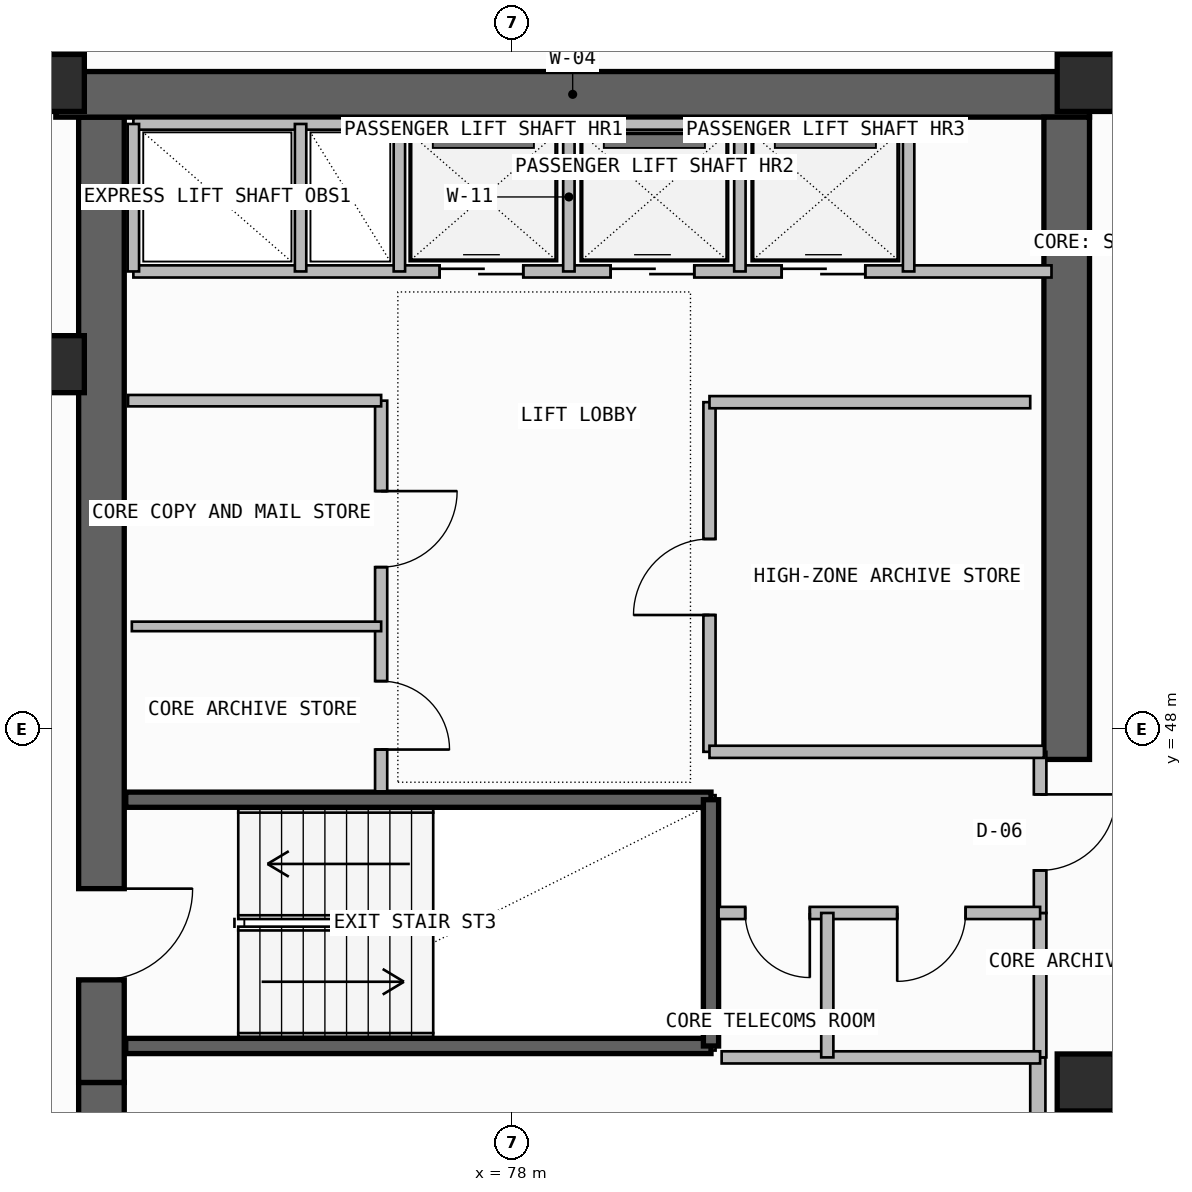
"""IFC4 building model, lengths in metres.
Left out: names, types, materials, properties, quantities, classifications, styles, units other than length and angle.
Written with IfcOpenShell. Run it as: python <this file> out.ifc"""

import sys

from ifc_helpers import new_model, si_unit, direction, frame, frame_2d, origin, origin_2d, place, context, subcontext, project, spatial, rectangle, extrude, element, fill, save


model = new_model("IFC4")
c1 = context("Model", 3, precision=1e-05, world=origin(), true_north=direction((0.0, 1.0)))
c2 = subcontext(c1, "Body", "Model", "MODEL_VIEW")
j1 = project(units=[si_unit("LENGTHUNIT", "METRE"), si_unit("PLANEANGLEUNIT", "RADIAN")], contexts=[c1])
p1 = place(None, origin())
s1 = spatial("IfcSite", under=j1, at=p1, CompositionType="ELEMENT")
p2 = place(p1, origin())
s2 = spatial("IfcBuilding", under=s1, at=p2, CompositionType="ELEMENT")
p3 = place(p2, frame((0.0, 0.0, 267.78)))
s3 = spatial("IfcBuildingStorey", under=s2, at=p3, CompositionType="ELEMENT", Elevation=267.78)
p4 = place(p3, frame((72.6, 35.5, -0.26), z_axis=(0.0, 0.0, 1.0), x_axis=(0.0, 1.0, 0.0)))
e1 = element("IfcWall", 1, at=p4, inside=s3, PredefinedType="SHEAR", context=c2, shape_type="SweptSolid", body=[
    extrude(rectangle(XDim=7.85, YDim=0.6, at=frame_2d((3.925, 0.0))), origin(), (0.0, 0.0, 1.0), 3.52),
])
p5 = place(p4, frame((1.45, 0.0, 0.26)))
e2 = element("IfcOpeningElement", 2, at=p5, cuts=e1, PredefinedType="OPENING", context=c2, shape_type="SweptSolid", body=[
    extrude(rectangle(XDim=1.2, YDim=2.2, at=frame_2d((0.6, 1.1))), frame((0.0, 0.31, 0.0), z_axis=(0.0, -1.0, 0.0), x_axis=(1.0, 0.0, 0.0)), (0.0, 0.0, 1.0), 0.62),
])
p6 = place(p3, frame((72.6, 43.35, -0.26), z_axis=(0.0, 0.0, 1.0), x_axis=(0.0, 1.0, 0.0)))
e3 = element("IfcWall", 3, at=p6, inside=s3, PredefinedType="SHEAR", context=c2, shape_type="SweptSolid", body=[
    extrude(rectangle(XDim=12.7, YDim=0.6, at=frame_2d((6.35, 0.0))), origin(), (0.0, 0.0, 1.0), 3.52),
])
p7 = place(p6, frame((1.35, 0.0, 0.26)))
e4 = element("IfcOpeningElement", 4, at=p7, cuts=e3, PredefinedType="OPENING", context=c2, shape_type="SweptSolid", body=[
    extrude(rectangle(XDim=1.2, YDim=2.2, at=frame_2d((0.6, 1.1))), frame((0.0, 0.31, 0.0), z_axis=(0.0, -1.0, 0.0), x_axis=(1.0, 0.0, 0.0)), (0.0, 0.0, 1.0), 0.62),
])
p8 = place(p3, frame((72.0, 56.35, -0.26), z_axis=(0.0, 0.0, 1.0), x_axis=(1.0, 0.0, 0.0)))
e5 = element("IfcWall", 5, at=p8, inside=s3, PredefinedType="SHEAR", context=c2, shape_type="SweptSolid", body=[
    extrude(rectangle(XDim=13.6, YDim=0.6, at=frame_2d((6.8, 0.0))), origin(), (0.0, 0.0, 1.0), 3.52),
])
p9 = place(p3, frame((85.3, 47.6, -0.26), z_axis=(0.0, 0.0, 1.0), x_axis=(0.0, 1.0, 0.0)))
e6 = element("IfcWall", 6, at=p9, inside=s3, PredefinedType="SHEAR", context=c2, shape_type="SweptSolid", body=[
    extrude(rectangle(XDim=8.45, YDim=0.6, at=frame_2d((4.225, 0.0))), origin(), (0.0, 0.0, 1.0), 3.52),
])
for number, where, z_axis, x_axis in (
    (7, (85.55, 43.35, 0.0), (0.0, 0.0, 1.0), (1.0, 0.0, 0.0)),
    (8, (72.0, 52.8, 0.0), (0.0, 0.0, 1.0), (1.0, 0.0, 0.0)),
    (9, (72.0, 56.5, 0.0), (0.0, 0.0, 1.0), (1.0, 0.0, 0.0)),
    (10, (85.55, 56.5, 0.0), (0.0, 0.0, 1.0), (1.0, 0.0, 0.0)),
):
    element("IfcColumn", number, at=place(p3, frame(where, z_axis=z_axis, x_axis=x_axis)), inside=s3, PredefinedType="COLUMN", context=c2, shape_type="SweptSolid", body=[
        extrude(rectangle(XDim=0.75, YDim=0.75, at=origin_2d()), origin(), (0.0, 0.0, 1.0), 3.52),
    ])
p10 = place(p3, frame((84.92, 38.85, 0.0), z_axis=(0.0, 0.0, 1.0), x_axis=(0.0, 1.0, 0.0)))
e11 = element("IfcWall", 11, at=p10, inside=s3, PredefinedType="SOLIDWALL", context=c2, shape_type="SweptSolid", body=[
    extrude(rectangle(XDim=4.83, YDim=0.2, at=frame_2d((2.415, 0.0))), origin(), (0.0, 0.0, 1.0), 3.26),
])
p11 = place(p10, frame((1.25, 0.0, 0.0)))
e12 = element("IfcOpeningElement", 12, at=p11, cuts=e11, PredefinedType="OPENING", context=c2, shape_type="SweptSolid", body=[
    extrude(rectangle(XDim=1.1, YDim=2.2, at=frame_2d((0.55, 1.1))), frame((0.0, 0.11, 0.0), z_axis=(0.0, -1.0, 0.0), x_axis=(1.0, 0.0, 0.0)), (0.0, 0.0, 1.0), 0.22),
])
for number, where, z_axis, x_axis in (
    (13, (72.92, 43.83, -0.26), (0.0, 0.0, 1.0), (1.0, 0.0, 0.0)),
    (14, (72.92, 47.07, -0.26), (0.0, 0.0, 1.0), (1.0, 0.0, 0.0)),
):
    element("IfcWall", number, at=place(p3, frame(where, z_axis=z_axis, x_axis=x_axis)), inside=s3, PredefinedType="SOLIDWALL", context=c2, shape_type="SweptSolid", body=[
        extrude(rectangle(XDim=7.7, YDim=0.2, at=frame_2d((3.85, 0.0))), origin(), (0.0, 0.0, 1.0), 3.52),
    ])
p12 = place(p3, frame((80.62, 43.83, -0.26), z_axis=(0.0, 0.0, 1.0), x_axis=(0.0, 1.0, 0.0)))
e15 = element("IfcWall", 15, at=p12, inside=s3, PredefinedType="SOLIDWALL", context=c2, shape_type="SweptSolid", body=[
    extrude(rectangle(XDim=3.24, YDim=0.2, at=frame_2d((1.62, 0.0))), origin(), (0.0, 0.0, 1.0), 3.52),
])
p13 = place(p3, frame((84.95, 43.68, 0.0), z_axis=(0.0, 0.0, 1.0), x_axis=(0.0, 1.0, 0.0)))
e16 = element("IfcWall", 16, at=p13, inside=s3, PredefinedType="PLUMBINGWALL", context=c2, shape_type="SweptSolid", body=[
    extrude(rectangle(XDim=1.9, YDim=0.165, at=frame_2d((0.95, 0.0))), origin(), (0.0, 0.0, 1.0), 3.26),
])
p14 = place(p3, frame((84.95, 45.58, 0.0), z_axis=(0.0, 0.0, 1.0), x_axis=(0.0, 1.0, 0.0)))
e17 = element("IfcWall", 17, at=p14, inside=s3, PredefinedType="PARTITIONING", context=c2, shape_type="SweptSolid", body=[
    extrude(rectangle(XDim=2.12, YDim=0.165, at=frame_2d((1.06, 0.0))), origin(), (0.0, 0.0, 1.0), 3.26),
])
p15 = place(p14, frame((0.56, 0.0, 0.0)))
e18 = element("IfcOpeningElement", 18, at=p15, cuts=e17, PredefinedType="OPENING", context=c2, shape_type="SweptSolid", body=[
    extrude(rectangle(XDim=1.0, YDim=2.2, at=frame_2d((0.5, 1.1))), frame((0.0, 0.093, 0.0), z_axis=(0.0, -1.0, 0.0), x_axis=(1.0, 0.0, 0.0)), (0.0, 0.0, 1.0), 0.185),
])
p16 = place(p3, frame((80.72, 45.58, 0.0), z_axis=(0.0, 0.0, 1.0), x_axis=(1.0, 0.0, 0.0)))
e19 = element("IfcWall", 19, at=p16, inside=s3, PredefinedType="PLUMBINGWALL", context=c2, shape_type="SweptSolid", body=[
    extrude(rectangle(XDim=4.23, YDim=0.16, at=frame_2d((2.115, 0.0))), origin(), (0.0, 0.0, 1.0), 3.26),
])
p17 = place(p16, frame((0.35, 0.0, 0.0)))
e20 = element("IfcOpeningElement", 20, at=p17, cuts=e19, PredefinedType="OPENING", context=c2, shape_type="SweptSolid", body=[
    extrude(rectangle(XDim=0.85, YDim=2.05, at=frame_2d((0.425, 1.025))), frame((0.0, 0.09, 0.0), z_axis=(0.0, -1.0, 0.0), x_axis=(1.0, 0.0, 0.0)), (0.0, 0.0, 1.0), 0.18),
])
p18 = place(p16, frame((2.35, 0.0, 0.0)))
e21 = element("IfcOpeningElement", 21, at=p18, cuts=e19, PredefinedType="OPENING", context=c2, shape_type="SweptSolid", body=[
    extrude(rectangle(XDim=0.9, YDim=2.1, at=frame_2d((0.45, 1.05))), frame((0.0, 0.09, 0.0), z_axis=(0.0, -1.0, 0.0), x_axis=(1.0, 0.0, 0.0)), (0.0, 0.0, 1.0), 0.18),
])
p19 = place(p3, frame((80.76, 43.68, 0.0), z_axis=(0.0, 0.0, 1.0), x_axis=(1.0, 0.0, 0.0)))
e22 = element("IfcWall", 22, at=p19, inside=s3, PredefinedType="PLUMBINGWALL", context=c2, shape_type="SweptSolid", body=[
    extrude(rectangle(XDim=4.19, YDim=0.16, at=frame_2d((2.095, 0.0))), origin(), (0.0, 0.0, 1.0), 3.26),
])
p20 = place(p3, frame((82.15, 43.68, 0.0), z_axis=(0.0, 0.0, 1.0), x_axis=(0.0, 1.0, 0.0)))
e23 = element("IfcWall", 23, at=p20, inside=s3, PredefinedType="PLUMBINGWALL", context=c2, shape_type="SweptSolid", body=[
    extrude(rectangle(XDim=1.9, YDim=0.16, at=frame_2d((0.95, 0.0))), origin(), (0.0, 0.0, 1.0), 3.26),
])
p21 = place(p3, frame((76.28, 47.18, 0.0), z_axis=(0.0, 0.0, 1.0), x_axis=(0.0, 1.0, 0.0)))
e24 = element("IfcWall", 24, at=p21, inside=s3, PredefinedType="SOLIDWALL", context=c2, shape_type="SweptSolid", body=[
    extrude(rectangle(XDim=5.14, YDim=0.16, at=frame_2d((2.57, 0.0))), origin(), (0.0, 0.0, 1.0), 3.26),
])
p22 = place(p21, frame((0.55, 0.0, 0.0)))
e25 = element("IfcOpeningElement", 25, at=p22, cuts=e24, PredefinedType="OPENING", context=c2, shape_type="SweptSolid", body=[
    extrude(rectangle(XDim=0.9, YDim=2.1, at=frame_2d((0.45, 1.05))), frame((0.0, 0.09, 0.0), z_axis=(0.0, -1.0, 0.0), x_axis=(1.0, 0.0, 0.0)), (0.0, 0.0, 1.0), 0.18),
])
p23 = place(p21, frame((2.95, 0.0, 0.0)))
e26 = element("IfcOpeningElement", 26, at=p23, cuts=e24, PredefinedType="OPENING", context=c2, shape_type="SweptSolid", body=[
    extrude(rectangle(XDim=1.0, YDim=2.2, at=frame_2d((0.5, 1.1))), frame((0.0, 0.09, 0.0), z_axis=(0.0, -1.0, 0.0), x_axis=(1.0, 0.0, 0.0)), (0.0, 0.0, 1.0), 0.18),
])
p24 = place(p3, frame((72.95, 52.32, 0.0), z_axis=(0.0, 0.0, 1.0), x_axis=(1.0, 0.0, 0.0)))
e27 = element("IfcWall", 27, at=p24, inside=s3, PredefinedType="SOLIDWALL", context=c2, shape_type="SweptSolid", body=[
    extrude(rectangle(XDim=3.33, YDim=0.15, at=frame_2d((1.665, 0.0))), origin(), (0.0, 0.0, 1.0), 3.26),
])
p25 = place(p3, frame((73.0, 49.35, 0.0), z_axis=(0.0, 0.0, 1.0), x_axis=(1.0, 0.0, 0.0)))
e28 = element("IfcWall", 28, at=p25, inside=s3, PredefinedType="PARTITIONING", context=c2, shape_type="SweptSolid", body=[
    extrude(rectangle(XDim=3.28, YDim=0.125, at=frame_2d((1.64, 0.0))), origin(), (0.0, 0.0, 1.0), 3.26),
])
p26 = place(p3, frame((80.6, 47.7, 0.0), z_axis=(0.0, 0.0, 1.0), x_axis=(0.0, 1.0, 0.0)))
e29 = element("IfcWall", 29, at=p26, inside=s3, PredefinedType="SOLIDWALL", context=c2, shape_type="SweptSolid", body=[
    extrude(rectangle(XDim=4.6, YDim=0.16, at=frame_2d((2.3, 0.0))), origin(), (0.0, 0.0, 1.0), 3.26),
])
p27 = place(p26, frame((1.8, 0.0, 0.0)))
e30 = element("IfcOpeningElement", 30, at=p27, cuts=e29, PredefinedType="OPENING", context=c2, shape_type="SweptSolid", body=[
    extrude(rectangle(XDim=1.0, YDim=2.2, at=frame_2d((0.5, 1.1))), frame((0.0, 0.09, 0.0), z_axis=(0.0, -1.0, 0.0), x_axis=(1.0, 0.0, 0.0)), (0.0, 0.0, 1.0), 0.18),
])
p28 = place(p3, frame((80.6, 47.7, 0.0), z_axis=(0.0, 0.0, 1.0), x_axis=(1.0, 0.0, 0.0)))
e31 = element("IfcWall", 31, at=p28, inside=s3, PredefinedType="SOLIDWALL", context=c2, shape_type="SweptSolid", body=[
    extrude(rectangle(XDim=4.4, YDim=0.16, at=frame_2d((2.2, 0.0))), origin(), (0.0, 0.0, 1.0), 3.26),
])
p29 = place(p3, frame((80.6, 52.3, 0.0), z_axis=(0.0, 0.0, 1.0), x_axis=(1.0, 0.0, 0.0)))
e32 = element("IfcWall", 32, at=p29, inside=s3, PredefinedType="SOLIDWALL", context=c2, shape_type="SweptSolid", body=[
    extrude(rectangle(XDim=4.22, YDim=0.16, at=frame_2d((2.11, 0.0))), origin(), (0.0, 0.0, 1.0), 3.26),
])
p30 = place(p3, frame((73.02, 54.02, 0.0), z_axis=(0.0, 0.0, 1.0), x_axis=(1.0, 0.0, 0.0)))
e33 = element("IfcWall", 33, at=p30, inside=s3, PredefinedType="SOLIDWALL", context=c2, shape_type="SweptSolid", body=[
    extrude(rectangle(XDim=12.08, YDim=0.16, at=frame_2d((6.04, 0.0))), origin(), (0.0, 0.0, 1.0), 3.26),
])
p31 = place(p30, frame((4.03, 0.0, 0.0)))
e34 = element("IfcOpeningElement", 34, at=p31, cuts=e33, PredefinedType="OPENING", context=c2, shape_type="SweptSolid", body=[
    extrude(rectangle(XDim=1.1, YDim=2.25, at=frame_2d((0.55, 1.125))), frame((0.0, 0.09, 0.0), z_axis=(0.0, -1.0, 0.0), x_axis=(1.0, 0.0, 0.0)), (0.0, 0.0, 1.0), 0.18),
])
p32 = place(p30, frame((6.28, 0.0, 0.0)))
e35 = element("IfcOpeningElement", 35, at=p32, cuts=e33, PredefinedType="OPENING", context=c2, shape_type="SweptSolid", body=[
    extrude(rectangle(XDim=1.1, YDim=2.25, at=frame_2d((0.55, 1.125))), frame((0.0, 0.09, 0.0), z_axis=(0.0, -1.0, 0.0), x_axis=(1.0, 0.0, 0.0)), (0.0, 0.0, 1.0), 0.18),
])
p33 = place(p30, frame((8.53, 0.0, 0.0)))
e36 = element("IfcOpeningElement", 36, at=p33, cuts=e33, PredefinedType="OPENING", context=c2, shape_type="SweptSolid", body=[
    extrude(rectangle(XDim=1.1, YDim=2.25, at=frame_2d((0.55, 1.125))), frame((0.0, 0.09, 0.0), z_axis=(0.0, -1.0, 0.0), x_axis=(1.0, 0.0, 0.0)), (0.0, 0.0, 1.0), 0.18),
])
p34 = place(p3, frame((73.02, 55.96, 0.0), z_axis=(0.0, 0.0, 1.0), x_axis=(1.0, 0.0, 0.0)))
e37 = element("IfcWall", 37, at=p34, inside=s3, PredefinedType="SOLIDWALL", context=c2, shape_type="SweptSolid", body=[
    extrude(rectangle(XDim=3.5, YDim=0.15, at=frame_2d((1.75, 0.0))), origin(), (0.0, 0.0, 1.0), 3.26),
])
p35 = place(p3, frame((73.02, 54.02, 0.0), z_axis=(0.0, 0.0, 1.0), x_axis=(0.0, 1.0, 0.0)))
e38 = element("IfcWall", 38, at=p35, inside=s3, PredefinedType="PLUMBINGWALL", context=c2, shape_type="SweptSolid", body=[
    extrude(rectangle(XDim=1.94, YDim=0.15, at=frame_2d((0.97, 0.0))), origin(), (0.0, 0.0, 1.0), 3.26),
])
p36 = place(p3, frame((76.52, 54.02, 0.0), z_axis=(0.0, 0.0, 1.0), x_axis=(0.0, 1.0, 0.0)))
e39 = element("IfcWall", 39, at=p36, inside=s3, PredefinedType="SOLIDWALL", context=c2, shape_type="SweptSolid", body=[
    extrude(rectangle(XDim=1.94, YDim=0.15, at=frame_2d((0.97, 0.0))), origin(), (0.0, 0.0, 1.0), 3.26),
])
p37 = place(p3, frame((75.22, 54.02, 0.0), z_axis=(0.0, 0.0, 1.0), x_axis=(0.0, 1.0, 0.0)))
e40 = element("IfcWall", 40, at=p37, inside=s3, PredefinedType="PLUMBINGWALL", context=c2, shape_type="SweptSolid", body=[
    extrude(rectangle(XDim=1.94, YDim=0.15, at=frame_2d((0.97, 0.0))), origin(), (0.0, 0.0, 1.0), 3.26),
])
for number, where, z_axis, x_axis in (
    (41, (78.75, 54.02, 0.0), (0.0, 0.0, 1.0), (0.0, 1.0, 0.0)),
    (42, (81.0, 54.02, 0.0), (0.0, 0.0, 1.0), (0.0, 1.0, 0.0)),
):
    element("IfcWall", number, at=place(p3, frame(where, z_axis=z_axis, x_axis=x_axis)), inside=s3, PredefinedType="PLUMBINGWALL", context=c2, shape_type="SweptSolid", body=[
        extrude(rectangle(XDim=1.96, YDim=0.15, at=frame_2d((0.98, 0.0))), origin(), (0.0, 0.0, 1.0), 3.26),
    ])
p38 = place(p3, frame((83.22, 54.02, 0.0), z_axis=(0.0, 0.0, 1.0), x_axis=(0.0, 1.0, 0.0)))
e43 = element("IfcWall", 43, at=p38, inside=s3, PredefinedType="SOLIDWALL", context=c2, shape_type="SweptSolid", body=[
    extrude(rectangle(XDim=1.96, YDim=0.15, at=frame_2d((0.98, 0.0))), origin(), (0.0, 0.0, 1.0), 3.26),
])
p39 = place(p3, frame((76.52, 55.96, 0.0), z_axis=(0.0, 0.0, 1.0), x_axis=(1.0, 0.0, 0.0)))
e44 = element("IfcWall", 44, at=p39, inside=s3, PredefinedType="SOLIDWALL", context=c2, shape_type="SweptSolid", body=[
    extrude(rectangle(XDim=6.7, YDim=0.15, at=frame_2d((3.35, 0.0))), origin(), (0.0, 0.0, 1.0), 3.26),
])
p40 = place(p7, frame((1.2, 0.0, 0.0), z_axis=(0.0, 0.0, 1.0), x_axis=(-1.0, 0.0, 0.0)))
e45 = element("IfcDoor", 45, at=p40, inside=s3, OperationType="SINGLE_SWING_LEFT", PredefinedType="USERDEFINED", context=c2, shape_type="SweptSolid", body=[
    extrude(rectangle(XDim=1.2, YDim=2.2, at=frame_2d((0.6, 1.1))), frame((0.0, 0.025, 0.0), z_axis=(0.0, -1.0, 0.0), x_axis=(1.0, 0.0, 0.0)), (0.0, 0.0, 1.0), 0.05),
])
fill(e4, e45)
p41 = place(p15, frame((1.0, 0.0, 0.0), z_axis=(0.0, 0.0, 1.0), x_axis=(-1.0, 0.0, 0.0)))
e46 = element("IfcDoor", 46, at=p41, inside=s3, OperationType="SINGLE_SWING_LEFT", PredefinedType="DOOR", context=c2, shape_type="SweptSolid", body=[
    extrude(rectangle(XDim=1.0, YDim=2.2, at=frame_2d((0.5, 1.1))), frame((0.0, 0.025, 0.0), z_axis=(0.0, -1.0, 0.0), x_axis=(1.0, 0.0, 0.0)), (0.0, 0.0, 1.0), 0.05),
])
fill(e18, e46)
p42 = place(p17, frame((0.85, 0.0, 0.0), z_axis=(0.0, 0.0, 1.0), x_axis=(-1.0, 0.0, 0.0)))
e47 = element("IfcDoor", 47, at=p42, inside=s3, OperationType="SINGLE_SWING_LEFT", PredefinedType="DOOR", context=c2, shape_type="SweptSolid", body=[
    extrude(rectangle(XDim=0.85, YDim=2.05, at=frame_2d((0.425, 1.025))), frame((0.0, 0.025, 0.0), z_axis=(0.0, -1.0, 0.0), x_axis=(1.0, 0.0, 0.0)), (0.0, 0.0, 1.0), 0.05),
])
fill(e20, e47)
p43 = place(p18, frame((0.9, 0.0, 0.0), z_axis=(0.0, 0.0, 1.0), x_axis=(-1.0, 0.0, 0.0)))
e48 = element("IfcDoor", 48, at=p43, inside=s3, OperationType="SINGLE_SWING_RIGHT", PredefinedType="DOOR", context=c2, shape_type="SweptSolid", body=[
    extrude(rectangle(XDim=0.9, YDim=2.1, at=frame_2d((0.45, 1.05))), frame((0.0, 0.025, 0.0), z_axis=(0.0, -1.0, 0.0), x_axis=(1.0, 0.0, 0.0)), (0.0, 0.0, 1.0), 0.05),
])
fill(e21, e48)
p44 = place(p22, frame((0.9, 0.0, 0.0), z_axis=(0.0, 0.0, 1.0), x_axis=(-1.0, 0.0, 0.0)))
e49 = element("IfcDoor", 49, at=p44, inside=s3, OperationType="SINGLE_SWING_RIGHT", PredefinedType="DOOR", context=c2, shape_type="SweptSolid", body=[
    extrude(rectangle(XDim=0.9, YDim=2.1, at=frame_2d((0.45, 1.05))), frame((0.0, 0.025, 0.0), z_axis=(0.0, -1.0, 0.0), x_axis=(1.0, 0.0, 0.0)), (0.0, 0.0, 1.0), 0.05),
])
fill(e25, e49)
p45 = place(p23, frame((1.0, 0.0, 0.0), z_axis=(0.0, 0.0, 1.0), x_axis=(-1.0, 0.0, 0.0)))
e50 = element("IfcDoor", 50, at=p45, inside=s3, OperationType="SINGLE_SWING_LEFT", PredefinedType="DOOR", context=c2, shape_type="SweptSolid", body=[
    extrude(rectangle(XDim=1.0, YDim=2.2, at=frame_2d((0.5, 1.1))), frame((0.0, 0.025, 0.0), z_axis=(0.0, -1.0, 0.0), x_axis=(1.0, 0.0, 0.0)), (0.0, 0.0, 1.0), 0.05),
])
fill(e26, e50)
p46 = place(p27, origin())
e51 = element("IfcDoor", 51, at=p46, inside=s3, OperationType="SINGLE_SWING_LEFT", PredefinedType="DOOR", context=c2, shape_type="SweptSolid", body=[
    extrude(rectangle(XDim=1.0, YDim=2.2, at=frame_2d((0.5, 1.1))), frame((0.0, 0.025, 0.0), z_axis=(0.0, -1.0, 0.0), x_axis=(1.0, 0.0, 0.0)), (0.0, 0.0, 1.0), 0.05),
])
fill(e30, e51)
p47 = place(p31, origin())
e52 = element("IfcDoor", 52, at=p47, inside=s3, OperationType="DOUBLE_DOOR_SLIDING", PredefinedType="DOOR", context=c2, shape_type="SweptSolid", body=[
    extrude(rectangle(XDim=1.1, YDim=2.25, at=frame_2d((0.55, 1.125))), frame((0.0, 0.025, 0.0), z_axis=(0.0, -1.0, 0.0), x_axis=(1.0, 0.0, 0.0)), (0.0, 0.0, 1.0), 0.05),
])
fill(e34, e52)
p48 = place(p32, origin())
e53 = element("IfcDoor", 53, at=p48, inside=s3, OperationType="DOUBLE_DOOR_SLIDING", PredefinedType="DOOR", context=c2, shape_type="SweptSolid", body=[
    extrude(rectangle(XDim=1.1, YDim=2.25, at=frame_2d((0.55, 1.125))), frame((0.0, 0.025, 0.0), z_axis=(0.0, -1.0, 0.0), x_axis=(1.0, 0.0, 0.0)), (0.0, 0.0, 1.0), 0.05),
])
fill(e35, e53)
p49 = place(p33, origin())
e54 = element("IfcDoor", 54, at=p49, inside=s3, OperationType="DOUBLE_DOOR_SLIDING", PredefinedType="DOOR", context=c2, shape_type="SweptSolid", body=[
    extrude(rectangle(XDim=1.1, YDim=2.25, at=frame_2d((0.55, 1.125))), frame((0.0, 0.025, 0.0), z_axis=(0.0, -1.0, 0.0), x_axis=(1.0, 0.0, 0.0)), (0.0, 0.0, 1.0), 0.05),
])
fill(e36, e54)
save(model, sys.argv[1])
